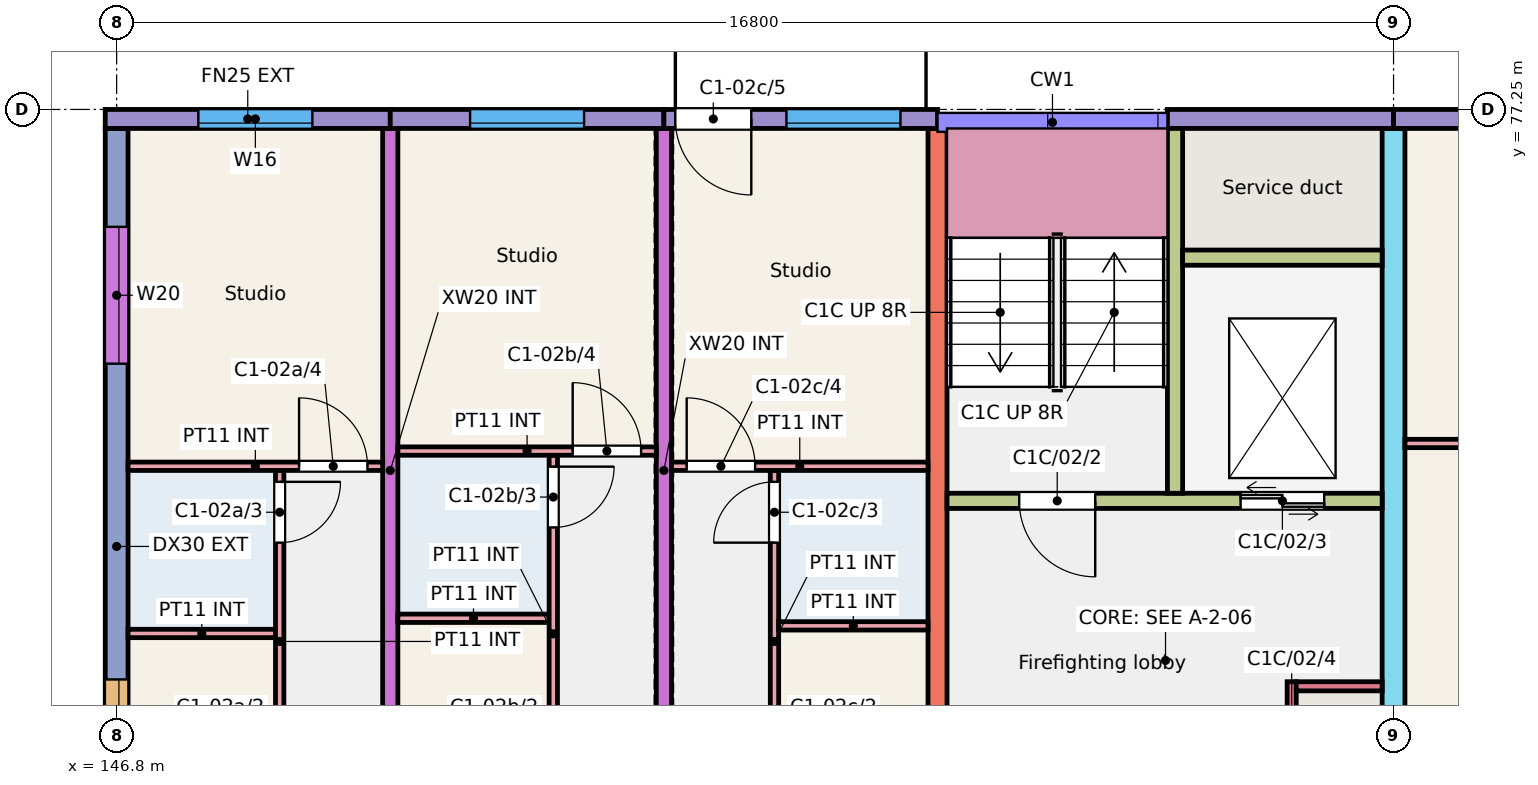
"""IFC4 building model, lengths in metres.
Left out: names, types, materials, properties, quantities, classifications, styles, units other than length and angle.
Written with IfcOpenShell. Run it as: python <this file> out.ifc"""

import sys

from ifc_helpers import new_model, si_unit, direction, frame, frame_2d, origin, place, context, subcontext, project, spatial, rectangle, extrude, element, fill, save


model = new_model("IFC4")
c1 = context("Model", 3, precision=1e-05, world=origin(), true_north=direction((0.0, 1.0)))
c2 = subcontext(c1, "Body", "Model", "MODEL_VIEW")
j1 = project(units=[si_unit("LENGTHUNIT", "METRE"), si_unit("PLANEANGLEUNIT", "RADIAN")], contexts=[c1])
p1 = place(None, origin())
s1 = spatial("IfcSite", under=j1, at=p1, CompositionType="ELEMENT")
p2 = place(p1, origin())
s2 = spatial("IfcBuilding", under=s1, at=p2, CompositionType="ELEMENT")
p3 = place(p2, frame((0.0, 0.0, 6.0)))
s3 = spatial("IfcBuildingStorey", under=s2, at=p3, CompositionType="ELEMENT", Elevation=6.0)
p4 = place(p3, frame((146.8, 66.0, 0.0), z_axis=(0.0, 0.0, 1.0), x_axis=(0.0, 1.0, 0.0)))
e1 = element("IfcWall", 1, at=p4, inside=s3, PredefinedType="SHEAR", context=c2, shape_type="SweptSolid", body=[
    extrude(rectangle(XDim=11.0, YDim=0.3, at=frame_2d((5.5, 0.0))), origin(), (0.0, 0.0, 1.0), 3.0),
])
p5 = place(p4, frame((2.55, 0.0, 0.9)))
e2 = element("IfcOpeningElement", 2, at=p5, cuts=e1, PredefinedType="OPENING", context=c2, shape_type="SweptSolid", body=[
    extrude(rectangle(XDim=1.2, YDim=1.5, at=frame_2d((0.6, 0.75))), frame((0.0, 0.16, 0.0), z_axis=(0.0, -1.0, 0.0), x_axis=(1.0, 0.0, 0.0)), (0.0, 0.0, 1.0), 0.32),
])
p6 = place(p4, frame((7.905, 0.0, 0.9)))
e3 = element("IfcOpeningElement", 3, at=p6, cuts=e1, PredefinedType="OPENING", context=c2, shape_type="SweptSolid", body=[
    extrude(rectangle(XDim=1.8, YDim=1.5, at=frame_2d((0.9, 0.75))), frame((0.0, 0.16, 0.0), z_axis=(0.0, -1.0, 0.0), x_axis=(1.0, 0.0, 0.0)), (0.0, 0.0, 1.0), 0.32),
])
for number, where, z_axis, x_axis in (
    (4, (150.4, 68.0, 0.0), (0.0, 0.0, 1.0), (0.0, 1.0, 0.0)),
    (5, (154.0, 68.0, 0.0), (0.0, 0.0, 1.0), (0.0, 1.0, 0.0)),
):
    element("IfcWall", number, at=place(p3, frame(where, z_axis=z_axis, x_axis=x_axis)), inside=s3, PredefinedType="SHEAR", context=c2, shape_type="SweptSolid", body=[
        extrude(rectangle(XDim=9.0, YDim=0.2, at=frame_2d((4.5, 0.0))), origin(), (0.0, 0.0, 1.0), 3.0),
    ])
p7 = place(p3, frame((157.6, 68.0, 0.0), z_axis=(0.0, 0.0, 1.0), x_axis=(0.0, 1.0, 0.0)))
e6 = element("IfcWall", 6, at=p7, inside=s3, PredefinedType="SHEAR", context=c2, shape_type="SweptSolid", body=[
    extrude(rectangle(XDim=9.0, YDim=0.25, at=frame_2d((4.5, 0.0))), origin(), (0.0, 0.0, 1.0), 3.0),
])
p8 = place(p3, frame((163.6, 66.0, 0.0), z_axis=(0.0, 0.0, 1.0), x_axis=(0.0, 1.0, 0.0)))
e7 = element("IfcWall", 7, at=p8, inside=s3, PredefinedType="SHEAR", context=c2, shape_type="SweptSolid", body=[
    extrude(rectangle(XDim=11.0, YDim=0.3, at=frame_2d((5.5, 0.0))), origin(), (0.0, 0.0, 1.0), 3.0),
])
p9 = place(p8, frame((0.3, 0.0, 0.0)))
e8 = element("IfcOpeningElement", 8, at=p9, cuts=e7, PredefinedType="OPENING", context=c2, shape_type="SweptSolid", body=[
    extrude(rectangle(XDim=1.2, YDim=2.1, at=frame_2d((0.6, 1.05))), frame((0.0, 0.16, 0.0), z_axis=(0.0, -1.0, 0.0), x_axis=(1.0, 0.0, 0.0)), (0.0, 0.0, 1.0), 0.32),
])
p10 = place(p3, frame((146.65, 77.125, 0.0), z_axis=(0.0, 0.0, 1.0), x_axis=(1.0, 0.0, 0.0)))
e9 = element("IfcWall", 9, at=p10, inside=s3, PredefinedType="SOLIDWALL", context=c2, shape_type="SweptSolid", body=[
    extrude(rectangle(XDim=3.75, YDim=0.25, at=frame_2d((1.875, 0.0))), origin(), (0.0, 0.0, 1.0), 3.0),
])
p11 = place(p10, frame((1.225, 0.0, 0.9)))
e10 = element("IfcOpeningElement", 10, at=p11, cuts=e9, PredefinedType="OPENING", context=c2, shape_type="SweptSolid", body=[
    extrude(rectangle(XDim=1.5, YDim=1.5, at=frame_2d((0.75, 0.75))), frame((0.0, 0.135, 0.0), z_axis=(0.0, -1.0, 0.0), x_axis=(1.0, 0.0, 0.0)), (0.0, 0.0, 1.0), 0.27),
])
p12 = place(p3, frame((150.4, 77.125, 0.0), z_axis=(0.0, 0.0, 1.0), x_axis=(1.0, 0.0, 0.0)))
e11 = element("IfcWall", 11, at=p12, inside=s3, PredefinedType="SOLIDWALL", context=c2, shape_type="SweptSolid", body=[
    extrude(rectangle(XDim=3.6, YDim=0.25, at=frame_2d((1.8, 0.0))), origin(), (0.0, 0.0, 1.0), 3.0),
])
p13 = place(p12, frame((1.05, 0.0, 0.9)))
e12 = element("IfcOpeningElement", 12, at=p13, cuts=e11, PredefinedType="OPENING", context=c2, shape_type="SweptSolid", body=[
    extrude(rectangle(XDim=1.5, YDim=1.5, at=frame_2d((0.75, 0.75))), frame((0.0, 0.135, 0.0), z_axis=(0.0, -1.0, 0.0), x_axis=(1.0, 0.0, 0.0)), (0.0, 0.0, 1.0), 0.27),
])
p14 = place(p3, frame((154.0, 77.125, 0.0), z_axis=(0.0, 0.0, 1.0), x_axis=(1.0, 0.0, 0.0)))
e13 = element("IfcWall", 13, at=p14, inside=s3, PredefinedType="SOLIDWALL", context=c2, shape_type="SweptSolid", body=[
    extrude(rectangle(XDim=3.6, YDim=0.25, at=frame_2d((1.8, 0.0))), origin(), (0.0, 0.0, 1.0), 3.0),
])
p15 = place(p14, frame((1.613, 0.0, 0.9)))
e14 = element("IfcOpeningElement", 14, at=p15, cuts=e13, PredefinedType="OPENING", context=c2, shape_type="SweptSolid", body=[
    extrude(rectangle(XDim=1.5, YDim=1.5, at=frame_2d((0.75, 0.75))), frame((0.0, 0.135, 0.0), z_axis=(0.0, -1.0, 0.0), x_axis=(1.0, 0.0, 0.0)), (0.0, 0.0, 1.0), 0.27),
])
p16 = place(p14, frame((0.15, 0.0, 0.0)))
e15 = element("IfcOpeningElement", 15, at=p16, cuts=e13, PredefinedType="OPENING", context=c2, shape_type="SweptSolid", body=[
    extrude(rectangle(XDim=1.0, YDim=2.1, at=frame_2d((0.5, 1.05))), frame((0.0, 0.135, 0.0), z_axis=(0.0, -1.0, 0.0), x_axis=(1.0, 0.0, 0.0)), (0.0, 0.0, 1.0), 0.27),
])
p17 = place(p3, frame((160.625, 77.125, 0.0), z_axis=(0.0, 0.0, 1.0), x_axis=(1.0, 0.0, 0.0)))
e16 = element("IfcWall", 16, at=p17, inside=s3, PredefinedType="SOLIDWALL", context=c2, shape_type="SweptSolid", body=[
    extrude(rectangle(XDim=2.975, YDim=0.25, at=frame_2d((1.488, 0.0))), origin(), (0.0, 0.0, 1.0), 3.0),
])
p18 = place(p3, frame((157.725, 72.1, 0.0), z_axis=(0.0, 0.0, 1.0), x_axis=(1.0, 0.0, 0.0)))
e17 = element("IfcWall", 17, at=p18, inside=s3, PredefinedType="SHEAR", context=c2, shape_type="SweptSolid", body=[
    extrude(rectangle(XDim=5.725, YDim=0.2, at=frame_2d((2.862, 0.0))), origin(), (0.0, 0.0, 1.0), 3.0),
])
p19 = place(p18, frame((0.95, 0.0, 0.0)))
e18 = element("IfcOpeningElement", 18, at=p19, cuts=e17, PredefinedType="OPENING", context=c2, shape_type="SweptSolid", body=[
    extrude(rectangle(XDim=1.0, YDim=2.1, at=frame_2d((0.5, 1.05))), frame((0.0, 0.11, 0.0), z_axis=(0.0, -1.0, 0.0), x_axis=(1.0, 0.0, 0.0)), (0.0, 0.0, 1.0), 0.22),
])
p20 = place(p18, frame((3.863, 0.0, 0.0)))
e19 = element("IfcOpeningElement", 19, at=p20, cuts=e17, PredefinedType="OPENING", context=c2, shape_type="SweptSolid", body=[
    extrude(rectangle(XDim=1.1, YDim=2.1, at=frame_2d((0.55, 1.05))), frame((0.0, 0.11, 0.0), z_axis=(0.0, -1.0, 0.0), x_axis=(1.0, 0.0, 0.0)), (0.0, 0.0, 1.0), 0.22),
])
p21 = place(p3, frame((160.725, 72.2, 0.0), z_axis=(0.0, 0.0, 1.0), x_axis=(0.0, 1.0, 0.0)))
e20 = element("IfcWall", 20, at=p21, inside=s3, PredefinedType="SHEAR", context=c2, shape_type="SweptSolid", body=[
    extrude(rectangle(XDim=4.8, YDim=0.2, at=frame_2d((2.4, 0.0))), origin(), (0.0, 0.0, 1.0), 3.0),
])
p22 = place(p3, frame((160.825, 75.3, 0.0), z_axis=(0.0, 0.0, 1.0), x_axis=(1.0, 0.0, 0.0)))
e21 = element("IfcWall", 21, at=p22, inside=s3, PredefinedType="SHEAR", context=c2, shape_type="SweptSolid", body=[
    extrude(rectangle(XDim=2.625, YDim=0.2, at=frame_2d((1.312, 0.0))), origin(), (0.0, 0.0, 1.0), 3.0),
])
p23 = place(p3, frame((162.26, 68.0, 0.0), z_axis=(0.0, 0.0, 1.0), x_axis=(0.0, 1.0, 0.0)))
e22 = element("IfcWall", 22, at=p23, inside=s3, PredefinedType="SHEAR", context=c2, shape_type="SweptSolid", body=[
    extrude(rectangle(XDim=1.72, YDim=0.12, at=frame_2d((0.86, 0.0))), origin(), (0.0, 0.0, 1.0), 3.0),
])
p24 = place(p23, frame((0.45, 0.0, 0.0)))
e23 = element("IfcOpeningElement", 23, at=p24, cuts=e22, PredefinedType="OPENING", context=c2, shape_type="SweptSolid", body=[
    extrude(rectangle(XDim=0.9, YDim=2.1, at=frame_2d((0.45, 1.05))), frame((0.0, 0.07, 0.0), z_axis=(0.0, -1.0, 0.0), x_axis=(1.0, 0.0, 0.0)), (0.0, 0.0, 1.0), 0.14),
])
p25 = place(p3, frame((162.32, 69.66, 0.0), z_axis=(0.0, 0.0, 1.0), x_axis=(1.0, 0.0, 0.0)))
e24 = element("IfcWall", 24, at=p25, inside=s3, PredefinedType="SHEAR", context=c2, shape_type="SweptSolid", body=[
    extrude(rectangle(XDim=1.13, YDim=0.12, at=frame_2d((0.565, 0.0))), origin(), (0.0, 0.0, 1.0), 3.0),
])
p26 = place(p3, frame((163.6, 77.125, 0.0), z_axis=(0.0, 0.0, 1.0), x_axis=(1.0, 0.0, 0.0)))
e25 = element("IfcWall", 25, at=p26, inside=s3, PredefinedType="SOLIDWALL", context=c2, shape_type="SweptSolid", body=[
    extrude(rectangle(XDim=3.6, YDim=0.25, at=frame_2d((1.8, 0.0))), origin(), (0.0, 0.0, 1.0), 3.0),
])
p27 = place(p26, frame((1.075, 0.0, 0.9)))
e26 = element("IfcOpeningElement", 26, at=p27, cuts=e25, PredefinedType="OPENING", context=c2, shape_type="SweptSolid", body=[
    extrude(rectangle(XDim=1.5, YDim=1.5, at=frame_2d((0.75, 0.75))), frame((0.0, 0.135, 0.0), z_axis=(0.0, -1.0, 0.0), x_axis=(1.0, 0.0, 0.0)), (0.0, 0.0, 1.0), 0.27),
])
p28 = place(p3, frame((146.95, 70.355, 0.0), z_axis=(0.0, 0.0, 1.0), x_axis=(1.0, 0.0, 0.0)))
e27 = element("IfcWall", 27, at=p28, inside=s3, PredefinedType="PARTITIONING", context=c2, shape_type="SweptSolid", body=[
    extrude(rectangle(XDim=1.94, YDim=0.11, at=frame_2d((0.97, 0.0))), origin(), (0.0, 0.0, 1.0), 2.8),
])
p29 = place(p3, frame((148.945, 68.0, 0.0), z_axis=(0.0, 0.0, 1.0), x_axis=(0.0, 1.0, 0.0)))
e28 = element("IfcWall", 28, at=p29, inside=s3, PredefinedType="PARTITIONING", context=c2, shape_type="SweptSolid", body=[
    extrude(rectangle(XDim=4.5, YDim=0.11, at=frame_2d((2.25, 0.0))), origin(), (0.0, 0.0, 1.0), 2.8),
])
p30 = place(p29, frame((0.2, 0.0, 0.0)))
e29 = element("IfcOpeningElement", 29, at=p30, cuts=e28, PredefinedType="OPENING", context=c2, shape_type="SweptSolid", body=[
    extrude(rectangle(XDim=0.8, YDim=2.1, at=frame_2d((0.4, 1.05))), frame((0.0, 0.065, 0.0), z_axis=(0.0, -1.0, 0.0), x_axis=(1.0, 0.0, 0.0)), (0.0, 0.0, 1.0), 0.13),
])
p31 = place(p29, frame((3.55, 0.0, 0.0)))
e30 = element("IfcOpeningElement", 30, at=p31, cuts=e28, PredefinedType="OPENING", context=c2, shape_type="SweptSolid", body=[
    extrude(rectangle(XDim=0.8, YDim=2.1, at=frame_2d((0.4, 1.05))), frame((0.0, 0.065, 0.0), z_axis=(0.0, -1.0, 0.0), x_axis=(1.0, 0.0, 0.0)), (0.0, 0.0, 1.0), 0.13),
])
p32 = place(p3, frame((146.95, 72.555, 0.0), z_axis=(0.0, 0.0, 1.0), x_axis=(1.0, 0.0, 0.0)))
e31 = element("IfcWall", 31, at=p32, inside=s3, PredefinedType="PARTITIONING", context=c2, shape_type="SweptSolid", body=[
    extrude(rectangle(XDim=3.35, YDim=0.11, at=frame_2d((1.675, 0.0))), origin(), (0.0, 0.0, 1.0), 2.8),
])
p33 = place(p32, frame((2.25, 0.0, 0.0)))
e32 = element("IfcOpeningElement", 32, at=p33, cuts=e31, PredefinedType="OPENING", context=c2, shape_type="SweptSolid", body=[
    extrude(rectangle(XDim=0.9, YDim=2.1, at=frame_2d((0.45, 1.05))), frame((0.0, 0.065, 0.0), z_axis=(0.0, -1.0, 0.0), x_axis=(1.0, 0.0, 0.0)), (0.0, 0.0, 1.0), 0.13),
])
p34 = place(p3, frame((150.5, 70.555, 0.0), z_axis=(0.0, 0.0, 1.0), x_axis=(1.0, 0.0, 0.0)))
e33 = element("IfcWall", 33, at=p34, inside=s3, PredefinedType="PARTITIONING", context=c2, shape_type="SweptSolid", body=[
    extrude(rectangle(XDim=1.99, YDim=0.11, at=frame_2d((0.995, 0.0))), origin(), (0.0, 0.0, 1.0), 2.8),
])
p35 = place(p3, frame((152.545, 68.0, 0.0), z_axis=(0.0, 0.0, 1.0), x_axis=(0.0, 1.0, 0.0)))
e34 = element("IfcWall", 34, at=p35, inside=s3, PredefinedType="PARTITIONING", context=c2, shape_type="SweptSolid", body=[
    extrude(rectangle(XDim=4.7, YDim=0.11, at=frame_2d((2.35, 0.0))), origin(), (0.0, 0.0, 1.0), 2.8),
])
p36 = place(p35, frame((0.2, 0.0, 0.0)))
e35 = element("IfcOpeningElement", 35, at=p36, cuts=e34, PredefinedType="OPENING", context=c2, shape_type="SweptSolid", body=[
    extrude(rectangle(XDim=0.8, YDim=2.1, at=frame_2d((0.4, 1.05))), frame((0.0, 0.065, 0.0), z_axis=(0.0, -1.0, 0.0), x_axis=(1.0, 0.0, 0.0)), (0.0, 0.0, 1.0), 0.13),
])
p37 = place(p35, frame((3.75, 0.0, 0.0)))
e36 = element("IfcOpeningElement", 36, at=p37, cuts=e34, PredefinedType="OPENING", context=c2, shape_type="SweptSolid", body=[
    extrude(rectangle(XDim=0.8, YDim=2.1, at=frame_2d((0.4, 1.05))), frame((0.0, 0.065, 0.0), z_axis=(0.0, -1.0, 0.0), x_axis=(1.0, 0.0, 0.0)), (0.0, 0.0, 1.0), 0.13),
])
p38 = place(p3, frame((150.5, 72.755, 0.0), z_axis=(0.0, 0.0, 1.0), x_axis=(1.0, 0.0, 0.0)))
e37 = element("IfcWall", 37, at=p38, inside=s3, PredefinedType="PARTITIONING", context=c2, shape_type="SweptSolid", body=[
    extrude(rectangle(XDim=3.4, YDim=0.11, at=frame_2d((1.7, 0.0))), origin(), (0.0, 0.0, 1.0), 2.8),
])
p39 = place(p38, frame((2.3, 0.0, 0.0)))
e38 = element("IfcOpeningElement", 38, at=p39, cuts=e37, PredefinedType="OPENING", context=c2, shape_type="SweptSolid", body=[
    extrude(rectangle(XDim=0.9, YDim=2.1, at=frame_2d((0.45, 1.05))), frame((0.0, 0.065, 0.0), z_axis=(0.0, -1.0, 0.0), x_axis=(1.0, 0.0, 0.0)), (0.0, 0.0, 1.0), 0.13),
])
p40 = place(p3, frame((155.455, 68.0, 0.0), z_axis=(0.0, 0.0, 1.0), x_axis=(0.0, 1.0, 0.0)))
e39 = element("IfcWall", 39, at=p40, inside=s3, PredefinedType="PARTITIONING", context=c2, shape_type="SweptSolid", body=[
    extrude(rectangle(XDim=4.5, YDim=0.11, at=frame_2d((2.25, 0.0))), origin(), (0.0, 0.0, 1.0), 2.8),
])
p41 = place(p40, frame((0.2, 0.0, 0.0)))
e40 = element("IfcOpeningElement", 40, at=p41, cuts=e39, PredefinedType="OPENING", context=c2, shape_type="SweptSolid", body=[
    extrude(rectangle(XDim=0.8, YDim=2.1, at=frame_2d((0.4, 1.05))), frame((0.0, 0.065, 0.0), z_axis=(0.0, -1.0, 0.0), x_axis=(1.0, 0.0, 0.0)), (0.0, 0.0, 1.0), 0.13),
])
p42 = place(p40, frame((3.55, 0.0, 0.0)))
e41 = element("IfcOpeningElement", 41, at=p42, cuts=e39, PredefinedType="OPENING", context=c2, shape_type="SweptSolid", body=[
    extrude(rectangle(XDim=0.8, YDim=2.1, at=frame_2d((0.4, 1.05))), frame((0.0, 0.065, 0.0), z_axis=(0.0, -1.0, 0.0), x_axis=(1.0, 0.0, 0.0)), (0.0, 0.0, 1.0), 0.13),
])
p43 = place(p3, frame((155.51, 70.455, 0.0), z_axis=(0.0, 0.0, 1.0), x_axis=(1.0, 0.0, 0.0)))
e42 = element("IfcWall", 42, at=p43, inside=s3, PredefinedType="PARTITIONING", context=c2, shape_type="SweptSolid", body=[
    extrude(rectangle(XDim=1.965, YDim=0.11, at=frame_2d((0.982, 0.0))), origin(), (0.0, 0.0, 1.0), 2.8),
])
p44 = place(p3, frame((154.1, 72.555, 0.0), z_axis=(0.0, 0.0, 1.0), x_axis=(1.0, 0.0, 0.0)))
e43 = element("IfcWall", 43, at=p44, inside=s3, PredefinedType="PARTITIONING", context=c2, shape_type="SweptSolid", body=[
    extrude(rectangle(XDim=3.375, YDim=0.11, at=frame_2d((1.688, 0.0))), origin(), (0.0, 0.0, 1.0), 2.8),
])
p45 = place(p44, frame((0.2, 0.0, 0.0)))
e44 = element("IfcOpeningElement", 44, at=p45, cuts=e43, PredefinedType="OPENING", context=c2, shape_type="SweptSolid", body=[
    extrude(rectangle(XDim=0.9, YDim=2.1, at=frame_2d((0.45, 1.05))), frame((0.0, 0.065, 0.0), z_axis=(0.0, -1.0, 0.0), x_axis=(1.0, 0.0, 0.0)), (0.0, 0.0, 1.0), 0.13),
])
p46 = place(p3, frame((163.75, 72.855, 0.0), z_axis=(0.0, 0.0, 1.0), x_axis=(1.0, 0.0, 0.0)))
e45 = element("IfcWall", 45, at=p46, inside=s3, PredefinedType="PARTITIONING", context=c2, shape_type="SweptSolid", body=[
    extrude(rectangle(XDim=3.35, YDim=0.11, at=frame_2d((1.675, 0.0))), origin(), (0.0, 0.0, 1.0), 2.8),
])
p47 = place(p11, origin())
e46 = element("IfcWindow", 46, at=p47, inside=s3, PartitioningType="SINGLE_PANEL", PredefinedType="WINDOW", context=c2, shape_type="SweptSolid", body=[
    extrude(rectangle(XDim=1.5, YDim=1.5, at=frame_2d((0.75, 0.75))), frame((0.0, -0.025, 0.0), z_axis=(0.0, -1.0, 0.0), x_axis=(1.0, 0.0, 0.0)), (0.0, 0.0, 1.0), 0.06),
])
fill(e10, e46)
p48 = place(p5, origin())
e47 = element("IfcWindow", 47, at=p48, inside=s3, PartitioningType="SINGLE_PANEL", PredefinedType="WINDOW", context=c2, shape_type="SweptSolid", body=[
    extrude(rectangle(XDim=1.2, YDim=1.5, at=frame_2d((0.6, 0.75))), frame((0.0, 0.0, 0.0), z_axis=(0.0, -1.0, 0.0), x_axis=(1.0, 0.0, 0.0)), (0.0, 0.0, 1.0), 0.06),
])
fill(e2, e47)
p49 = place(p6, origin())
e48 = element("IfcWindow", 48, at=p49, inside=s3, PartitioningType="SINGLE_PANEL", PredefinedType="WINDOW", context=c2, shape_type="SweptSolid", body=[
    extrude(rectangle(XDim=1.8, YDim=1.5, at=frame_2d((0.9, 0.75))), frame((0.0, 0.0, 0.0), z_axis=(0.0, -1.0, 0.0), x_axis=(1.0, 0.0, 0.0)), (0.0, 0.0, 1.0), 0.06),
])
fill(e3, e48)
p50 = place(p13, origin())
e49 = element("IfcWindow", 49, at=p50, inside=s3, PartitioningType="SINGLE_PANEL", PredefinedType="WINDOW", context=c2, shape_type="SweptSolid", body=[
    extrude(rectangle(XDim=1.5, YDim=1.5, at=frame_2d((0.75, 0.75))), frame((0.0, -0.025, 0.0), z_axis=(0.0, -1.0, 0.0), x_axis=(1.0, 0.0, 0.0)), (0.0, 0.0, 1.0), 0.06),
])
fill(e12, e49)
p51 = place(p15, origin())
e50 = element("IfcWindow", 50, at=p51, inside=s3, PartitioningType="SINGLE_PANEL", PredefinedType="WINDOW", context=c2, shape_type="SweptSolid", body=[
    extrude(rectangle(XDim=1.5, YDim=1.5, at=frame_2d((0.75, 0.75))), frame((0.0, -0.025, 0.0), z_axis=(0.0, -1.0, 0.0), x_axis=(1.0, 0.0, 0.0)), (0.0, 0.0, 1.0), 0.06),
])
fill(e14, e50)
p52 = place(p31, origin())
e51 = element("IfcDoor", 51, at=p52, inside=s3, OperationType="SINGLE_SWING_RIGHT", PredefinedType="DOOR", context=c2, shape_type="SweptSolid", body=[
    extrude(rectangle(XDim=0.8, YDim=2.1, at=frame_2d((0.4, 1.05))), frame((0.0, 0.025, 0.0), z_axis=(0.0, -1.0, 0.0), x_axis=(1.0, 0.0, 0.0)), (0.0, 0.0, 1.0), 0.05),
])
fill(e30, e51)
p53 = place(p33, origin())
e52 = element("IfcDoor", 52, at=p53, inside=s3, OperationType="SINGLE_SWING_LEFT", PredefinedType="DOOR", context=c2, shape_type="SweptSolid", body=[
    extrude(rectangle(XDim=0.9, YDim=2.1, at=frame_2d((0.45, 1.05))), frame((0.0, 0.025, 0.0), z_axis=(0.0, -1.0, 0.0), x_axis=(1.0, 0.0, 0.0)), (0.0, 0.0, 1.0), 0.05),
])
fill(e32, e52)
p54 = place(p37, origin())
e53 = element("IfcDoor", 53, at=p54, inside=s3, OperationType="SINGLE_SWING_RIGHT", PredefinedType="DOOR", context=c2, shape_type="SweptSolid", body=[
    extrude(rectangle(XDim=0.8, YDim=2.1, at=frame_2d((0.4, 1.05))), frame((0.0, 0.025, 0.0), z_axis=(0.0, -1.0, 0.0), x_axis=(1.0, 0.0, 0.0)), (0.0, 0.0, 1.0), 0.05),
])
fill(e36, e53)
p55 = place(p39, origin())
e54 = element("IfcDoor", 54, at=p55, inside=s3, OperationType="SINGLE_SWING_LEFT", PredefinedType="DOOR", context=c2, shape_type="SweptSolid", body=[
    extrude(rectangle(XDim=0.9, YDim=2.1, at=frame_2d((0.45, 1.05))), frame((0.0, 0.025, 0.0), z_axis=(0.0, -1.0, 0.0), x_axis=(1.0, 0.0, 0.0)), (0.0, 0.0, 1.0), 0.05),
])
fill(e38, e54)
p56 = place(p42, origin())
e55 = element("IfcDoor", 55, at=p56, inside=s3, OperationType="SINGLE_SWING_LEFT", PredefinedType="DOOR", context=c2, shape_type="SweptSolid", body=[
    extrude(rectangle(XDim=0.8, YDim=2.1, at=frame_2d((0.4, 1.05))), frame((0.0, 0.025, 0.0), z_axis=(0.0, -1.0, 0.0), x_axis=(1.0, 0.0, 0.0)), (0.0, 0.0, 1.0), 0.05),
])
fill(e41, e55)
p57 = place(p45, origin())
e56 = element("IfcDoor", 56, at=p57, inside=s3, OperationType="SINGLE_SWING_LEFT", PredefinedType="DOOR", context=c2, shape_type="SweptSolid", body=[
    extrude(rectangle(XDim=0.9, YDim=2.1, at=frame_2d((0.45, 1.05))), frame((0.0, 0.025, 0.0), z_axis=(0.0, -1.0, 0.0), x_axis=(1.0, 0.0, 0.0)), (0.0, 0.0, 1.0), 0.05),
])
fill(e44, e56)
p58 = place(p16, origin())
e57 = element("IfcDoor", 57, at=p58, inside=s3, OperationType="SINGLE_SWING_RIGHT", PredefinedType="DOOR", context=c2, shape_type="SweptSolid", body=[
    extrude(rectangle(XDim=1.0, YDim=2.1, at=frame_2d((0.5, 1.05))), frame((0.0, 0.025, 0.0), z_axis=(0.0, -1.0, 0.0), x_axis=(1.0, 0.0, 0.0)), (0.0, 0.0, 1.0), 0.05),
])
fill(e15, e57)
p59 = place(p19, origin())
e58 = element("IfcDoor", 58, at=p59, inside=s3, OperationType="SINGLE_SWING_RIGHT", PredefinedType="DOOR", context=c2, shape_type="SweptSolid", body=[
    extrude(rectangle(XDim=1.0, YDim=2.1, at=frame_2d((0.5, 1.05))), frame((0.0, 0.025, 0.0), z_axis=(0.0, -1.0, 0.0), x_axis=(1.0, 0.0, 0.0)), (0.0, 0.0, 1.0), 0.05),
])
fill(e18, e58)
p60 = place(p20, origin())
e59 = element("IfcDoor", 59, at=p60, inside=s3, OperationType="DOUBLE_DOOR_SLIDING", PredefinedType="DOOR", context=c2, shape_type="SweptSolid", body=[
    extrude(rectangle(XDim=1.1, YDim=2.1, at=frame_2d((0.55, 1.05))), frame((0.0, 0.025, 0.0), z_axis=(0.0, -1.0, 0.0), x_axis=(1.0, 0.0, 0.0)), (0.0, 0.0, 1.0), 0.05),
])
fill(e19, e59)
save(model, sys.argv[1])
